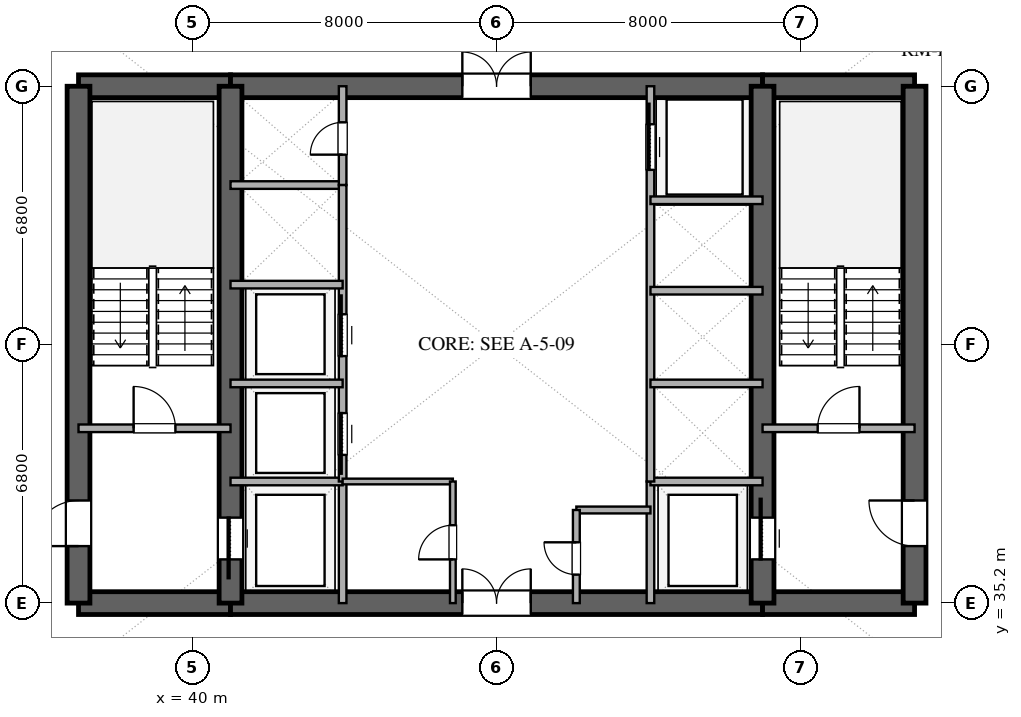
"""IFC4 building model, lengths in metres.
Left out: names, types, materials, properties, quantities, classifications, styles, units other than length and angle.
Written with IfcOpenShell. Run it as: python <this file> out.ifc"""

import sys

from ifc_helpers import new_model, si_unit, direction, frame, frame_2d, origin, place, context, subcontext, project, spatial, rectangle, extrude, element, fill, save


model = new_model("IFC4")
c1 = context("Model", 3, precision=1e-05, world=origin(), true_north=direction((0.0, 1.0)))
c2 = subcontext(c1, "Body", "Model", "MODEL_VIEW")
j1 = project(units=[si_unit("LENGTHUNIT", "METRE"), si_unit("PLANEANGLEUNIT", "RADIAN")], contexts=[c1])
p1 = place(None, origin())
s1 = spatial("IfcSite", under=j1, at=p1, CompositionType="ELEMENT")
p2 = place(p1, origin())
s2 = spatial("IfcBuilding", under=s1, at=p2, CompositionType="ELEMENT")
p3 = place(p2, frame((0.0, 0.0, 31.8)))
s3 = spatial("IfcBuildingStorey", under=s2, at=p3, CompositionType="ELEMENT", Elevation=31.8)
p4 = place(p3, frame((37.0, 35.2, 0.0), z_axis=(0.0, 0.0, 1.0), x_axis=(1.0, 0.0, 0.0)))
e1 = element("IfcWall", 1, at=p4, inside=s3, PredefinedType="SHEAR", context=c2, shape_type="SweptSolid", body=[
    extrude(rectangle(XDim=4.0, YDim=0.6, at=frame_2d((2.0, 0.0))), origin(), (0.0, 0.0, 1.0), 3.38),
])
p5 = place(p3, frame((41.0, 35.2, 0.0), z_axis=(0.0, 0.0, 1.0), x_axis=(1.0, 0.0, 0.0)))
e2 = element("IfcWall", 2, at=p5, inside=s3, PredefinedType="SHEAR", context=c2, shape_type="SweptSolid", body=[
    extrude(rectangle(XDim=14.0, YDim=0.6, at=frame_2d((7.0, 0.0))), origin(), (0.0, 0.0, 1.0), 3.38),
])
p6 = place(p5, frame((6.1, 0.0, 0.0)))
e3 = element("IfcOpeningElement", 3, at=p6, cuts=e2, PredefinedType="OPENING", context=c2, shape_type="SweptSolid", body=[
    extrude(rectangle(XDim=1.8, YDim=2.25, at=frame_2d((0.9, 1.125))), frame((0.0, 0.31, 0.0), z_axis=(0.0, -1.0, 0.0), x_axis=(1.0, 0.0, 0.0)), (0.0, 0.0, 1.0), 0.62),
])
for number, where, z_axis, x_axis in (
    (4, (55.0, 35.2, 0.0), (0.0, 0.0, 1.0), (1.0, 0.0, 0.0)),
    (5, (37.0, 48.8, 0.0), (0.0, 0.0, 1.0), (1.0, 0.0, 0.0)),
):
    element("IfcWall", number, at=place(p3, frame(where, z_axis=z_axis, x_axis=x_axis)), inside=s3, PredefinedType="SHEAR", context=c2, shape_type="SweptSolid", body=[
        extrude(rectangle(XDim=4.0, YDim=0.6, at=frame_2d((2.0, 0.0))), origin(), (0.0, 0.0, 1.0), 3.38),
    ])
p7 = place(p3, frame((41.0, 48.8, 0.0), z_axis=(0.0, 0.0, 1.0), x_axis=(1.0, 0.0, 0.0)))
e6 = element("IfcWall", 6, at=p7, inside=s3, PredefinedType="SHEAR", context=c2, shape_type="SweptSolid", body=[
    extrude(rectangle(XDim=14.0, YDim=0.6, at=frame_2d((7.0, 0.0))), origin(), (0.0, 0.0, 1.0), 3.38),
])
p8 = place(p7, frame((6.1, 0.0, 0.0)))
e7 = element("IfcOpeningElement", 7, at=p8, cuts=e6, PredefinedType="OPENING", context=c2, shape_type="SweptSolid", body=[
    extrude(rectangle(XDim=1.8, YDim=2.25, at=frame_2d((0.9, 1.125))), frame((0.0, 0.31, 0.0), z_axis=(0.0, -1.0, 0.0), x_axis=(1.0, 0.0, 0.0)), (0.0, 0.0, 1.0), 0.62),
])
p9 = place(p3, frame((55.0, 48.8, 0.0), z_axis=(0.0, 0.0, 1.0), x_axis=(1.0, 0.0, 0.0)))
e8 = element("IfcWall", 8, at=p9, inside=s3, PredefinedType="SHEAR", context=c2, shape_type="SweptSolid", body=[
    extrude(rectangle(XDim=4.0, YDim=0.6, at=frame_2d((2.0, 0.0))), origin(), (0.0, 0.0, 1.0), 3.38),
])
p10 = place(p3, frame((37.0, 35.2, 0.0), z_axis=(0.0, 0.0, 1.0), x_axis=(0.0, 1.0, 0.0)))
e9 = element("IfcWall", 9, at=p10, inside=s3, PredefinedType="SHEAR", context=c2, shape_type="SweptSolid", body=[
    extrude(rectangle(XDim=13.6, YDim=0.6, at=frame_2d((6.8, 0.0))), origin(), (0.0, 0.0, 1.0), 3.38),
])
p11 = place(p10, frame((1.5, 0.0, 0.0)))
e10 = element("IfcOpeningElement", 10, at=p11, cuts=e9, PredefinedType="OPENING", context=c2, shape_type="SweptSolid", body=[
    extrude(rectangle(XDim=1.2, YDim=2.15, at=frame_2d((0.6, 1.075))), frame((0.0, 0.31, 0.0), z_axis=(0.0, -1.0, 0.0), x_axis=(1.0, 0.0, 0.0)), (0.0, 0.0, 1.0), 0.62),
])
p12 = place(p3, frame((59.0, 35.2, 0.0), z_axis=(0.0, 0.0, 1.0), x_axis=(0.0, 1.0, 0.0)))
e11 = element("IfcWall", 11, at=p12, inside=s3, PredefinedType="SHEAR", context=c2, shape_type="SweptSolid", body=[
    extrude(rectangle(XDim=13.6, YDim=0.6, at=frame_2d((6.8, 0.0))), origin(), (0.0, 0.0, 1.0), 3.38),
])
p13 = place(p12, frame((1.5, 0.0, 0.0)))
e12 = element("IfcOpeningElement", 12, at=p13, cuts=e11, PredefinedType="OPENING", context=c2, shape_type="SweptSolid", body=[
    extrude(rectangle(XDim=1.2, YDim=2.15, at=frame_2d((0.6, 1.075))), frame((0.0, 0.31, 0.0), z_axis=(0.0, -1.0, 0.0), x_axis=(1.0, 0.0, 0.0)), (0.0, 0.0, 1.0), 0.62),
])
p14 = place(p3, frame((41.0, 35.2, 0.0), z_axis=(0.0, 0.0, 1.0), x_axis=(0.0, 1.0, 0.0)))
e13 = element("IfcWall", 13, at=p14, inside=s3, PredefinedType="SHEAR", context=c2, shape_type="SweptSolid", body=[
    extrude(rectangle(XDim=13.6, YDim=0.6, at=frame_2d((6.8, 0.0))), origin(), (0.0, 0.0, 1.0), 3.38),
])
p15 = place(p14, frame((1.15, 0.0, 0.0)))
e14 = element("IfcOpeningElement", 14, at=p15, cuts=e13, PredefinedType="OPENING", context=c2, shape_type="SweptSolid", body=[
    extrude(rectangle(XDim=1.1, YDim=2.2, at=frame_2d((0.55, 1.1))), frame((0.0, 0.31, 0.0), z_axis=(0.0, -1.0, 0.0), x_axis=(1.0, 0.0, 0.0)), (0.0, 0.0, 1.0), 0.62),
])
p16 = place(p3, frame((55.0, 35.2, 0.0), z_axis=(0.0, 0.0, 1.0), x_axis=(0.0, 1.0, 0.0)))
e15 = element("IfcWall", 15, at=p16, inside=s3, PredefinedType="SHEAR", context=c2, shape_type="SweptSolid", body=[
    extrude(rectangle(XDim=13.6, YDim=0.6, at=frame_2d((6.8, 0.0))), origin(), (0.0, 0.0, 1.0), 3.38),
])
p17 = place(p16, frame((1.15, 0.0, 0.0)))
e16 = element("IfcOpeningElement", 16, at=p17, cuts=e15, PredefinedType="OPENING", context=c2, shape_type="SweptSolid", body=[
    extrude(rectangle(XDim=1.1, YDim=2.2, at=frame_2d((0.55, 1.1))), frame((0.0, 0.31, 0.0), z_axis=(0.0, -1.0, 0.0), x_axis=(1.0, 0.0, 0.0)), (0.0, 0.0, 1.0), 0.62),
])
p18 = place(p3, frame((37.0, 39.8, 0.0), z_axis=(0.0, 0.0, 1.0), x_axis=(1.0, 0.0, 0.0)))
e17 = element("IfcWall", 17, at=p18, inside=s3, PredefinedType="SOLIDWALL", context=c2, shape_type="SweptSolid", body=[
    extrude(rectangle(XDim=4.0, YDim=0.2, at=frame_2d((2.0, 0.0))), origin(), (0.0, 0.0, 1.0), 2.74),
])
p19 = place(p18, frame((1.45, 0.0, 0.0)))
e18 = element("IfcOpeningElement", 18, at=p19, cuts=e17, PredefinedType="OPENING", context=c2, shape_type="SweptSolid", body=[
    extrude(rectangle(XDim=1.1, YDim=2.15, at=frame_2d((0.55, 1.075))), frame((0.0, 0.11, 0.0), z_axis=(0.0, -1.0, 0.0), x_axis=(1.0, 0.0, 0.0)), (0.0, 0.0, 1.0), 0.22),
])
p20 = place(p3, frame((55.0, 39.8, 0.0), z_axis=(0.0, 0.0, 1.0), x_axis=(1.0, 0.0, 0.0)))
e19 = element("IfcWall", 19, at=p20, inside=s3, PredefinedType="SOLIDWALL", context=c2, shape_type="SweptSolid", body=[
    extrude(rectangle(XDim=4.0, YDim=0.2, at=frame_2d((2.0, 0.0))), origin(), (0.0, 0.0, 1.0), 2.74),
])
p21 = place(p20, frame((1.45, 0.0, 0.0)))
e20 = element("IfcOpeningElement", 20, at=p21, cuts=e19, PredefinedType="OPENING", context=c2, shape_type="SweptSolid", body=[
    extrude(rectangle(XDim=1.1, YDim=2.15, at=frame_2d((0.55, 1.075))), frame((0.0, 0.11, 0.0), z_axis=(0.0, -1.0, 0.0), x_axis=(1.0, 0.0, 0.0)), (0.0, 0.0, 1.0), 0.22),
])
p22 = place(p3, frame((43.95, 35.2, 0.0), z_axis=(0.0, 0.0, 1.0), x_axis=(0.0, 1.0, 0.0)))
e21 = element("IfcWall", 21, at=p22, inside=s3, PredefinedType="SOLIDWALL", context=c2, shape_type="SweptSolid", body=[
    extrude(rectangle(XDim=3.2, YDim=0.2, at=frame_2d((1.6, 0.0))), origin(), (0.0, 0.0, 1.0), 2.74),
])
p23 = place(p3, frame((41.0, 38.4, 0.0), z_axis=(0.0, 0.0, 1.0), x_axis=(1.0, 0.0, 0.0)))
e22 = element("IfcWall", 22, at=p23, inside=s3, PredefinedType="SOLIDWALL", context=c2, shape_type="SweptSolid", body=[
    extrude(rectangle(XDim=2.95, YDim=0.2, at=frame_2d((1.475, 0.0))), origin(), (0.0, 0.0, 1.0), 2.74),
])
p24 = place(p3, frame((52.05, 35.2, 0.0), z_axis=(0.0, 0.0, 1.0), x_axis=(0.0, 1.0, 0.0)))
e23 = element("IfcWall", 23, at=p24, inside=s3, PredefinedType="SOLIDWALL", context=c2, shape_type="SweptSolid", body=[
    extrude(rectangle(XDim=3.2, YDim=0.2, at=frame_2d((1.6, 0.0))), origin(), (0.0, 0.0, 1.0), 2.74),
])
for number, where, z_axis, x_axis in (
    (24, (52.05, 38.4, 0.0), (0.0, 0.0, 1.0), (1.0, 0.0, 0.0)),
    (25, (41.0, 46.2, 0.0), (0.0, 0.0, 1.0), (1.0, 0.0, 0.0)),
):
    element("IfcWall", number, at=place(p3, frame(where, z_axis=z_axis, x_axis=x_axis)), inside=s3, PredefinedType="SOLIDWALL", context=c2, shape_type="SweptSolid", body=[
        extrude(rectangle(XDim=2.95, YDim=0.2, at=frame_2d((1.475, 0.0))), origin(), (0.0, 0.0, 1.0), 2.74),
    ])
p25 = place(p3, frame((43.95, 46.2, 0.0), z_axis=(0.0, 0.0, 1.0), x_axis=(0.0, 1.0, 0.0)))
e26 = element("IfcWall", 26, at=p25, inside=s3, PredefinedType="SOLIDWALL", context=c2, shape_type="SweptSolid", body=[
    extrude(rectangle(XDim=2.6, YDim=0.2, at=frame_2d((1.3, 0.0))), origin(), (0.0, 0.0, 1.0), 2.74),
])
p26 = place(p25, frame((0.8, 0.0, 0.0)))
e27 = element("IfcOpeningElement", 27, at=p26, cuts=e26, PredefinedType="OPENING", context=c2, shape_type="SweptSolid", body=[
    extrude(rectangle(XDim=0.85, YDim=2.15, at=frame_2d((0.425, 1.075))), frame((0.0, 0.11, 0.0), z_axis=(0.0, -1.0, 0.0), x_axis=(1.0, 0.0, 0.0)), (0.0, 0.0, 1.0), 0.22),
])
p27 = place(p3, frame((43.95, 38.4, 0.0), z_axis=(0.0, 0.0, 1.0), x_axis=(0.0, 1.0, 0.0)))
e28 = element("IfcWall", 28, at=p27, inside=s3, PredefinedType="SOLIDWALL", context=c2, shape_type="SweptSolid", body=[
    extrude(rectangle(XDim=7.8, YDim=0.2, at=frame_2d((3.9, 0.0))), origin(), (0.0, 0.0, 1.0), 2.74),
])
p28 = place(p27, frame((0.7, 0.0, 0.0)))
e29 = element("IfcOpeningElement", 29, at=p28, cuts=e28, PredefinedType="OPENING", context=c2, shape_type="SweptSolid", body=[
    extrude(rectangle(XDim=1.1, YDim=2.2, at=frame_2d((0.55, 1.1))), frame((0.0, 0.11, 0.0), z_axis=(0.0, -1.0, 0.0), x_axis=(1.0, 0.0, 0.0)), (0.0, 0.0, 1.0), 0.22),
])
p29 = place(p27, frame((3.3, 0.0, 0.0)))
e30 = element("IfcOpeningElement", 30, at=p29, cuts=e28, PredefinedType="OPENING", context=c2, shape_type="SweptSolid", body=[
    extrude(rectangle(XDim=1.1, YDim=2.2, at=frame_2d((0.55, 1.1))), frame((0.0, 0.11, 0.0), z_axis=(0.0, -1.0, 0.0), x_axis=(1.0, 0.0, 0.0)), (0.0, 0.0, 1.0), 0.22),
])
for number, where, z_axis, x_axis in (
    (31, (41.0, 40.98, 0.0), (0.0, 0.0, 1.0), (1.0, 0.0, 0.0)),
    (32, (41.0, 43.58, 0.0), (0.0, 0.0, 1.0), (1.0, 0.0, 0.0)),
):
    element("IfcWall", number, at=place(p3, frame(where, z_axis=z_axis, x_axis=x_axis)), inside=s3, PredefinedType="SOLIDWALL", context=c2, shape_type="SweptSolid", body=[
        extrude(rectangle(XDim=2.95, YDim=0.2, at=frame_2d((1.475, 0.0))), origin(), (0.0, 0.0, 1.0), 2.74),
    ])
p30 = place(p3, frame((52.05, 38.4, 0.0), z_axis=(0.0, 0.0, 1.0), x_axis=(0.0, 1.0, 0.0)))
e33 = element("IfcWall", 33, at=p30, inside=s3, PredefinedType="SOLIDWALL", context=c2, shape_type="SweptSolid", body=[
    extrude(rectangle(XDim=10.4, YDim=0.2, at=frame_2d((5.2, 0.0))), origin(), (0.0, 0.0, 1.0), 2.74),
])
p31 = place(p30, frame((8.2, 0.0, 0.0)))
e34 = element("IfcOpeningElement", 34, at=p31, cuts=e33, PredefinedType="OPENING", context=c2, shape_type="SweptSolid", body=[
    extrude(rectangle(XDim=1.2, YDim=2.2, at=frame_2d((0.6, 1.1))), frame((0.0, 0.11, 0.0), z_axis=(0.0, -1.0, 0.0), x_axis=(1.0, 0.0, 0.0)), (0.0, 0.0, 1.0), 0.22),
])
for number, where, z_axis, x_axis in (
    (35, (52.05, 40.98, 0.0), (0.0, 0.0, 1.0), (1.0, 0.0, 0.0)),
    (36, (52.05, 43.42, 0.0), (0.0, 0.0, 1.0), (1.0, 0.0, 0.0)),
    (37, (52.05, 45.8, 0.0), (0.0, 0.0, 1.0), (1.0, 0.0, 0.0)),
):
    element("IfcWall", number, at=place(p3, frame(where, z_axis=z_axis, x_axis=x_axis)), inside=s3, PredefinedType="SOLIDWALL", context=c2, shape_type="SweptSolid", body=[
        extrude(rectangle(XDim=2.95, YDim=0.2, at=frame_2d((1.475, 0.0))), origin(), (0.0, 0.0, 1.0), 2.74),
    ])
p32 = place(p3, frame((43.95, 38.4, 0.0), z_axis=(0.0, 0.0, 1.0), x_axis=(1.0, 0.0, 0.0)))
e38 = element("IfcWall", 38, at=p32, inside=s3, PredefinedType="PARTITIONING", context=c2, shape_type="SweptSolid", body=[
    extrude(rectangle(XDim=2.9, YDim=0.15, at=frame_2d((1.45, 0.0))), origin(), (0.0, 0.0, 1.0), 2.74),
])
p33 = place(p3, frame((46.85, 35.2, 0.0), z_axis=(0.0, 0.0, 1.0), x_axis=(0.0, 1.0, 0.0)))
e39 = element("IfcWall", 39, at=p33, inside=s3, PredefinedType="PARTITIONING", context=c2, shape_type="SweptSolid", body=[
    extrude(rectangle(XDim=3.2, YDim=0.15, at=frame_2d((1.6, 0.0))), origin(), (0.0, 0.0, 1.0), 2.74),
])
p34 = place(p33, frame((1.15, 0.0, 0.0)))
e40 = element("IfcOpeningElement", 40, at=p34, cuts=e39, PredefinedType="OPENING", context=c2, shape_type="SweptSolid", body=[
    extrude(rectangle(XDim=0.9, YDim=2.15, at=frame_2d((0.45, 1.075))), frame((0.0, 0.085, 0.0), z_axis=(0.0, -1.0, 0.0), x_axis=(1.0, 0.0, 0.0)), (0.0, 0.0, 1.0), 0.17),
])
p35 = place(p3, frame((50.1, 37.65, 0.0), z_axis=(0.0, 0.0, 1.0), x_axis=(1.0, 0.0, 0.0)))
e41 = element("IfcWall", 41, at=p35, inside=s3, PredefinedType="PLUMBINGWALL", context=c2, shape_type="SweptSolid", body=[
    extrude(rectangle(XDim=1.95, YDim=0.18, at=frame_2d((0.975, 0.0))), origin(), (0.0, 0.0, 1.0), 2.74),
])
p36 = place(p3, frame((50.1, 35.2, 0.0), z_axis=(0.0, 0.0, 1.0), x_axis=(0.0, 1.0, 0.0)))
e42 = element("IfcWall", 42, at=p36, inside=s3, PredefinedType="PLUMBINGWALL", context=c2, shape_type="SweptSolid", body=[
    extrude(rectangle(XDim=2.45, YDim=0.18, at=frame_2d((1.225, 0.0))), origin(), (0.0, 0.0, 1.0), 2.74),
])
p37 = place(p36, frame((0.75, 0.0, 0.0)))
e43 = element("IfcOpeningElement", 43, at=p37, cuts=e42, PredefinedType="OPENING", context=c2, shape_type="SweptSolid", body=[
    extrude(rectangle(XDim=0.85, YDim=2.1, at=frame_2d((0.425, 1.05))), frame((0.0, 0.1, 0.0), z_axis=(0.0, -1.0, 0.0), x_axis=(1.0, 0.0, 0.0)), (0.0, 0.0, 1.0), 0.2),
])
p38 = place(p15, origin())
e44 = element("IfcDoor", 44, at=p38, inside=s3, OperationType="SLIDING_TO_LEFT", PredefinedType="DOOR", context=c2, shape_type="SweptSolid", body=[
    extrude(rectangle(XDim=1.1, YDim=2.2, at=frame_2d((0.55, 1.1))), frame((0.0, 0.025, 0.0), z_axis=(0.0, -1.0, 0.0), x_axis=(1.0, 0.0, 0.0)), (0.0, 0.0, 1.0), 0.05),
])
fill(e14, e44)
p39 = place(p17, origin())
e45 = element("IfcDoor", 45, at=p39, inside=s3, OperationType="SLIDING_TO_RIGHT", PredefinedType="DOOR", context=c2, shape_type="SweptSolid", body=[
    extrude(rectangle(XDim=1.1, YDim=2.2, at=frame_2d((0.55, 1.1))), frame((0.0, 0.025, 0.0), z_axis=(0.0, -1.0, 0.0), x_axis=(1.0, 0.0, 0.0)), (0.0, 0.0, 1.0), 0.05),
])
fill(e16, e45)
p40 = place(p11, origin())
e46 = element("IfcDoor", 46, at=p40, inside=s3, OperationType="SINGLE_SWING_LEFT", PredefinedType="DOOR", context=c2, shape_type="SweptSolid", body=[
    extrude(rectangle(XDim=1.2, YDim=2.15, at=frame_2d((0.6, 1.075))), frame((0.0, 0.025, 0.0), z_axis=(0.0, -1.0, 0.0), x_axis=(1.0, 0.0, 0.0)), (0.0, 0.0, 1.0), 0.05),
])
fill(e10, e46)
p41 = place(p13, origin())
e47 = element("IfcDoor", 47, at=p41, inside=s3, OperationType="SINGLE_SWING_RIGHT", PredefinedType="DOOR", context=c2, shape_type="SweptSolid", body=[
    extrude(rectangle(XDim=1.2, YDim=2.15, at=frame_2d((0.6, 1.075))), frame((0.0, 0.025, 0.0), z_axis=(0.0, -1.0, 0.0), x_axis=(1.0, 0.0, 0.0)), (0.0, 0.0, 1.0), 0.05),
])
fill(e12, e47)
p42 = place(p6, origin())
e48 = element("IfcDoor", 48, at=p42, inside=s3, OperationType="DOUBLE_DOOR_SINGLE_SWING", PredefinedType="DOOR", context=c2, shape_type="SweptSolid", body=[
    extrude(rectangle(XDim=1.8, YDim=2.25, at=frame_2d((0.9, 1.125))), frame((0.0, 0.025, 0.0), z_axis=(0.0, -1.0, 0.0), x_axis=(1.0, 0.0, 0.0)), (0.0, 0.0, 1.0), 0.05),
])
fill(e3, e48)
p43 = place(p8, origin())
e49 = element("IfcDoor", 49, at=p43, inside=s3, OperationType="DOUBLE_DOOR_SINGLE_SWING", PredefinedType="DOOR", context=c2, shape_type="SweptSolid", body=[
    extrude(rectangle(XDim=1.8, YDim=2.25, at=frame_2d((0.9, 1.125))), frame((0.0, 0.025, 0.0), z_axis=(0.0, -1.0, 0.0), x_axis=(1.0, 0.0, 0.0)), (0.0, 0.0, 1.0), 0.05),
])
fill(e7, e49)
p44 = place(p19, origin())
e50 = element("IfcDoor", 50, at=p44, inside=s3, OperationType="SINGLE_SWING_LEFT", PredefinedType="DOOR", context=c2, shape_type="SweptSolid", body=[
    extrude(rectangle(XDim=1.1, YDim=2.15, at=frame_2d((0.55, 1.075))), frame((0.0, 0.025, 0.0), z_axis=(0.0, -1.0, 0.0), x_axis=(1.0, 0.0, 0.0)), (0.0, 0.0, 1.0), 0.05),
])
fill(e18, e50)
p45 = place(p21, origin())
e51 = element("IfcDoor", 51, at=p45, inside=s3, OperationType="SINGLE_SWING_RIGHT", PredefinedType="DOOR", context=c2, shape_type="SweptSolid", body=[
    extrude(rectangle(XDim=1.1, YDim=2.15, at=frame_2d((0.55, 1.075))), frame((0.0, 0.025, 0.0), z_axis=(0.0, -1.0, 0.0), x_axis=(1.0, 0.0, 0.0)), (0.0, 0.0, 1.0), 0.05),
])
fill(e20, e51)
p46 = place(p26, origin())
e52 = element("IfcDoor", 52, at=p46, inside=s3, OperationType="SINGLE_SWING_LEFT", PredefinedType="DOOR", context=c2, shape_type="SweptSolid", body=[
    extrude(rectangle(XDim=0.85, YDim=2.15, at=frame_2d((0.425, 1.075))), frame((0.0, 0.025, 0.0), z_axis=(0.0, -1.0, 0.0), x_axis=(1.0, 0.0, 0.0)), (0.0, 0.0, 1.0), 0.05),
])
fill(e27, e52)
p47 = place(p28, origin())
e53 = element("IfcDoor", 53, at=p47, inside=s3, OperationType="SLIDING_TO_LEFT", PredefinedType="DOOR", context=c2, shape_type="SweptSolid", body=[
    extrude(rectangle(XDim=1.1, YDim=2.2, at=frame_2d((0.55, 1.1))), frame((0.0, 0.025, 0.0), z_axis=(0.0, -1.0, 0.0), x_axis=(1.0, 0.0, 0.0)), (0.0, 0.0, 1.0), 0.05),
])
fill(e29, e53)
p48 = place(p29, origin())
e54 = element("IfcDoor", 54, at=p48, inside=s3, OperationType="SLIDING_TO_RIGHT", PredefinedType="DOOR", context=c2, shape_type="SweptSolid", body=[
    extrude(rectangle(XDim=1.1, YDim=2.2, at=frame_2d((0.55, 1.1))), frame((0.0, 0.025, 0.0), z_axis=(0.0, -1.0, 0.0), x_axis=(1.0, 0.0, 0.0)), (0.0, 0.0, 1.0), 0.05),
])
fill(e30, e54)
p49 = place(p31, origin())
e55 = element("IfcDoor", 55, at=p49, inside=s3, OperationType="SLIDING_TO_RIGHT", PredefinedType="DOOR", context=c2, shape_type="SweptSolid", body=[
    extrude(rectangle(XDim=1.2, YDim=2.2, at=frame_2d((0.6, 1.1))), frame((0.0, 0.025, 0.0), z_axis=(0.0, -1.0, 0.0), x_axis=(1.0, 0.0, 0.0)), (0.0, 0.0, 1.0), 0.05),
])
fill(e34, e55)
p50 = place(p34, origin())
e56 = element("IfcDoor", 56, at=p50, inside=s3, OperationType="SINGLE_SWING_LEFT", PredefinedType="DOOR", context=c2, shape_type="SweptSolid", body=[
    extrude(rectangle(XDim=0.9, YDim=2.15, at=frame_2d((0.45, 1.075))), frame((0.0, 0.025, 0.0), z_axis=(0.0, -1.0, 0.0), x_axis=(1.0, 0.0, 0.0)), (0.0, 0.0, 1.0), 0.05),
])
fill(e40, e56)
p51 = place(p37, origin())
e57 = element("IfcDoor", 57, at=p51, inside=s3, OperationType="SINGLE_SWING_RIGHT", PredefinedType="DOOR", context=c2, shape_type="SweptSolid", body=[
    extrude(rectangle(XDim=0.85, YDim=2.1, at=frame_2d((0.425, 1.05))), frame((0.0, 0.025, 0.0), z_axis=(0.0, -1.0, 0.0), x_axis=(1.0, 0.0, 0.0)), (0.0, 0.0, 1.0), 0.05),
])
fill(e43, e57)
save(model, sys.argv[1])
